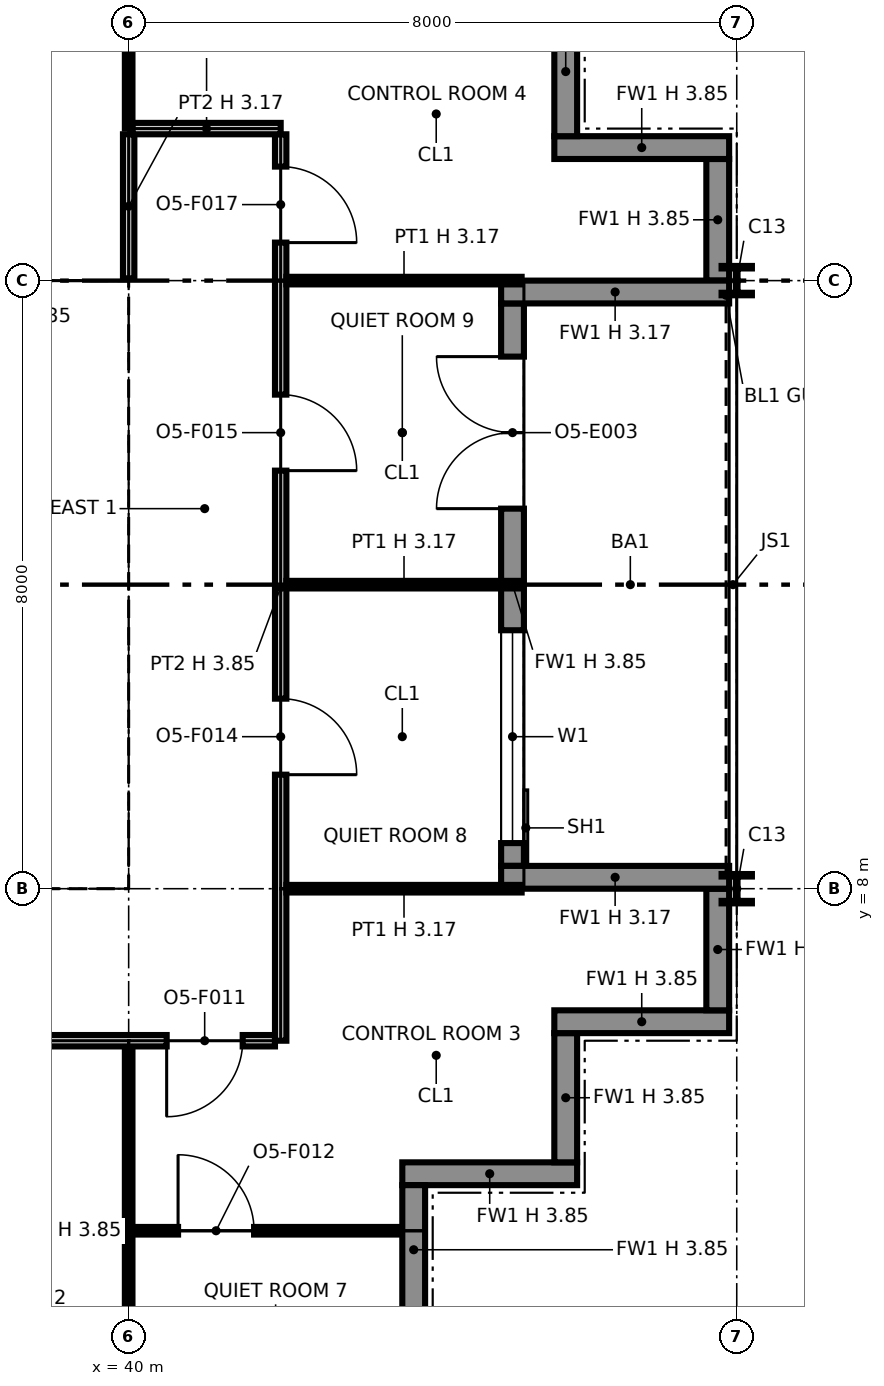
"""IFC4 building model, lengths in metres.
Left out: names, types, materials, properties, quantities, classifications, styles, units other than length and angle.
Written with IfcOpenShell. Run it as: python <this file> out.ifc"""

import sys

from ifc_helpers import new_model, si_unit, direction, frame, frame_2d, origin, origin_2d, place, context, subcontext, project, spatial, polyline, rectangle, i_section, outline, extrude, element, fill, save


model = new_model("IFC4")
c1 = context("Model", 3, precision=1e-05, world=origin(), true_north=direction((0.0, 1.0)))
c2 = subcontext(c1, "Body", "Model", "MODEL_VIEW")
j1 = project(units=[si_unit("LENGTHUNIT", "METRE"), si_unit("PLANEANGLEUNIT", "RADIAN")], contexts=[c1])
p1 = place(None, origin())
s1 = spatial("IfcSite", under=j1, at=p1, CompositionType="ELEMENT")
p2 = place(p1, origin())
s2 = spatial("IfcBuilding", under=s1, at=p2, CompositionType="ELEMENT")
p3 = place(p2, frame((0.0, 0.0, 225.0)))
s3 = spatial("IfcBuildingStorey", under=s2, at=p3, CompositionType="ELEMENT", Elevation=225.0)
for number, where, z_axis, x_axis in (
    (1, (40.0, 8.0, 0.0), (0.0, 0.0, 1.0), (1.0, 0.0, 0.0)),
    (2, (40.0, 16.0, 0.0), (0.0, 0.0, 1.0), (1.0, 0.0, 0.0)),
):
    element("IfcColumn", number, at=place(p3, frame(where, z_axis=z_axis, x_axis=x_axis)), inside=s3, PredefinedType="COLUMN", context=c2, shape_type="SweptSolid", body=[
        extrude(i_section(OverallWidth=0.373, OverallDepth=0.368, WebThickness=0.015, FlangeThickness=0.024, at=origin_2d()), origin(), (0.0, 0.0, 1.0), 3.85),
    ])
for number, where, z_axis, x_axis in (
    (3, (48.0, 8.0, 0.0), (0.0, 0.0, 1.0), (1.0, 0.0, 0.0)),
    (4, (48.0, 16.0, 0.0), (0.0, 0.0, 1.0), (1.0, 0.0, 0.0)),
):
    element("IfcColumn", number, at=place(p3, frame(where, z_axis=z_axis, x_axis=x_axis)), inside=s3, PredefinedType="COLUMN", context=c2, shape_type="SweptSolid", body=[
        extrude(i_section(OverallWidth=0.399, OverallDepth=0.386, WebThickness=0.021, FlangeThickness=0.033, at=origin_2d()), origin(), (0.0, 0.0, 1.0), 3.85),
    ])
p4 = place(p3, frame((43.75, 2.4, 0.0), z_axis=(0.0, 0.0, 1.0), x_axis=(0.0, 1.0, 0.0)))
e5 = element("IfcWall", 5, at=p4, inside=s3, PredefinedType="SOLIDWALL", context=c2, shape_type="SweptSolid", body=[
    extrude(rectangle(XDim=1.7, YDim=0.3, at=frame_2d((0.85, 0.0))), origin(), (0.0, 0.0, 1.0), 3.85),
])
p5 = place(p3, frame((43.6, 4.25, 0.0), z_axis=(0.0, 0.0, 1.0), x_axis=(1.0, 0.0, 0.0)))
e6 = element("IfcWall", 6, at=p5, inside=s3, PredefinedType="SOLIDWALL", context=c2, shape_type="SweptSolid", body=[
    extrude(rectangle(XDim=2.3, YDim=0.3, at=frame_2d((1.15, 0.0))), origin(), (0.0, 0.0, 1.0), 3.85),
])
p6 = place(p3, frame((45.75, 4.4, 0.0), z_axis=(0.0, 0.0, 1.0), x_axis=(0.0, 1.0, 0.0)))
e7 = element("IfcWall", 7, at=p6, inside=s3, PredefinedType="SOLIDWALL", context=c2, shape_type="SweptSolid", body=[
    extrude(rectangle(XDim=1.7, YDim=0.3, at=frame_2d((0.85, 0.0))), origin(), (0.0, 0.0, 1.0), 3.85),
])
p7 = place(p3, frame((45.6, 6.25, 0.0), z_axis=(0.0, 0.0, 1.0), x_axis=(1.0, 0.0, 0.0)))
e8 = element("IfcWall", 8, at=p7, inside=s3, PredefinedType="SOLIDWALL", context=c2, shape_type="SweptSolid", body=[
    extrude(rectangle(XDim=2.3, YDim=0.3, at=frame_2d((1.15, 0.0))), origin(), (0.0, 0.0, 1.0), 3.85),
])
p8 = place(p3, frame((47.75, 6.4, 0.0), z_axis=(0.0, 0.0, 1.0), x_axis=(0.0, 1.0, 0.0)))
e9 = element("IfcWall", 9, at=p8, inside=s3, PredefinedType="SOLIDWALL", context=c2, shape_type="SweptSolid", body=[
    extrude(rectangle(XDim=1.6, YDim=0.3, at=frame_2d((0.8, 0.0))), origin(), (0.0, 0.0, 1.0), 3.85),
])
p9 = place(p3, frame((45.05, 8.3, 0.0), z_axis=(0.0, 0.0, 1.0), x_axis=(0.0, 1.0, 0.0)))
e10 = element("IfcWall", 10, at=p9, inside=s3, PredefinedType="SOLIDWALL", context=c2, shape_type="SweptSolid", body=[
    extrude(rectangle(XDim=7.4, YDim=0.3, at=frame_2d((3.7, 0.0))), origin(), (0.0, 0.0, 1.0), 3.85),
])
p10 = place(p9, frame((0.3, 0.0, 0.9)))
e11 = element("IfcOpeningElement", 11, at=p10, cuts=e10, PredefinedType="OPENING", context=c2, shape_type="SweptSolid", body=[
    extrude(rectangle(XDim=2.8, YDim=2.2, at=frame_2d((1.4, 1.1))), frame((0.0, 0.16, 0.0), z_axis=(0.0, -1.0, 0.0), x_axis=(1.0, 0.0, 0.0)), (0.0, 0.0, 1.0), 0.32),
])
p11 = place(p9, frame((4.7, 0.0, 0.0)))
e12 = element("IfcOpeningElement", 12, at=p11, cuts=e10, PredefinedType="OPENING", context=c2, shape_type="SweptSolid", body=[
    extrude(rectangle(XDim=2.0, YDim=2.4, at=frame_2d((1.0, 1.2))), frame((0.0, 0.16, 0.0), z_axis=(0.0, -1.0, 0.0), x_axis=(1.0, 0.0, 0.0)), (0.0, 0.0, 1.0), 0.32),
])
for number, where, z_axis, x_axis in (
    (13, (47.9, 8.15, 0.0), (0.0, 0.0, 1.0), (-1.0, 0.0, 0.0)),
    (14, (47.9, 15.85, 0.0), (0.0, 0.0, 1.0), (-1.0, 0.0, 0.0)),
):
    element("IfcWall", number, at=place(p3, frame(where, z_axis=z_axis, x_axis=x_axis)), inside=s3, PredefinedType="SOLIDWALL", context=c2, shape_type="SweptSolid", body=[
        extrude(rectangle(XDim=3.0, YDim=0.3, at=frame_2d((1.5, 0.0))), origin(), (0.0, 0.0, 1.0), 3.171),
    ])
p12 = place(p3, frame((47.75, 16.0, 0.0), z_axis=(0.0, 0.0, 1.0), x_axis=(0.0, 1.0, 0.0)))
e15 = element("IfcWall", 15, at=p12, inside=s3, PredefinedType="SOLIDWALL", context=c2, shape_type="SweptSolid", body=[
    extrude(rectangle(XDim=1.6, YDim=0.3, at=frame_2d((0.8, 0.0))), origin(), (0.0, 0.0, 1.0), 3.85),
])
p13 = place(p3, frame((47.9, 17.75, 0.0), z_axis=(0.0, 0.0, 1.0), x_axis=(-1.0, 0.0, 0.0)))
e16 = element("IfcWall", 16, at=p13, inside=s3, PredefinedType="SOLIDWALL", context=c2, shape_type="SweptSolid", body=[
    extrude(rectangle(XDim=2.3, YDim=0.3, at=frame_2d((1.15, 0.0))), origin(), (0.0, 0.0, 1.0), 3.85),
])
p14 = place(p3, frame((45.75, 17.9, 0.0), z_axis=(0.0, 0.0, 1.0), x_axis=(0.0, 1.0, 0.0)))
e17 = element("IfcWall", 17, at=p14, inside=s3, PredefinedType="SOLIDWALL", context=c2, shape_type="SweptSolid", body=[
    extrude(rectangle(XDim=1.7, YDim=0.3, at=frame_2d((0.85, 0.0))), origin(), (0.0, 0.0, 1.0), 3.85),
])
p15 = place(p3, frame((24.65, 8.75, 0.0), z_axis=(0.0, 0.0, 1.0), x_axis=(1.0, 0.0, 0.0)))
e18 = element("IfcWall", 18, at=p15, inside=s3, PredefinedType="PARTITIONING", context=c2, shape_type="SweptSolid", body=[
    extrude(outline(polyline([(0.0, 0.0), (14.7, 0.0), (14.7, 3.85), (7.438, 3.85), (7.438, 3.308), (7.262, 3.308), (7.261, 3.85), (0.0, 3.85), (0.0, 0.0)])), frame((0.0, 0.1, 0.0), z_axis=(0.0, -1.0, 0.0), x_axis=(1.0, 0.0, 0.0)), (0.0, 0.0, 1.0), 0.2),
])
p16 = place(p3, frame((24.65, 15.25, 0.0), z_axis=(0.0, 0.0, 1.0), x_axis=(1.0, 0.0, 0.0)))
e19 = element("IfcWall", 19, at=p16, inside=s3, PredefinedType="PARTITIONING", context=c2, shape_type="SweptSolid", body=[
    extrude(outline(polyline([(0.0, 0.0), (14.7, 0.0), (14.7, 3.85), (7.438, 3.85), (7.438, 3.308), (7.262, 3.308), (7.261, 3.85), (0.0, 3.85), (0.0, 0.0)])), frame((0.0, 0.1, 0.0), z_axis=(0.0, -1.0, 0.0), x_axis=(1.0, 0.0, 0.0)), (0.0, 0.0, 1.0), 0.2),
])
p17 = place(p16, frame((2.85, 0.0, 0.0)))
e20 = element("IfcOpeningElement", 20, at=p17, cuts=e19, PredefinedType="OPENING", context=c2, shape_type="SweptSolid", body=[
    extrude(rectangle(XDim=1.8, YDim=2.1, at=frame_2d((0.9, 1.05))), frame((0.0, 0.11, 0.0), z_axis=(0.0, -1.0, 0.0), x_axis=(1.0, 0.0, 0.0)), (0.0, 0.0, 1.0), 0.22),
])
p18 = place(p16, frame((9.95, 0.0, 0.0), z_axis=(0.0, 0.0, 1.0), x_axis=(-1.0, 0.0, 0.0)))
e21 = element("IfcOpeningElement", 21, at=p18, cuts=e19, PredefinedType="OPENING", context=c2, shape_type="SweptSolid", body=[
    extrude(rectangle(XDim=1.4, YDim=2.1, at=frame_2d((0.7, 1.05))), frame((0.0, 0.11, 0.0), z_axis=(0.0, -1.0, 0.0), x_axis=(1.0, 0.0, 0.0)), (0.0, 0.0, 1.0), 0.22),
])
p19 = place(p16, frame((13.4, 0.0, 0.0), z_axis=(0.0, 0.0, 1.0), x_axis=(-1.0, 0.0, 0.0)))
e22 = element("IfcOpeningElement", 22, at=p19, cuts=e19, PredefinedType="OPENING", context=c2, shape_type="SweptSolid", body=[
    extrude(rectangle(XDim=1.4, YDim=2.1, at=frame_2d((0.7, 1.05))), frame((0.0, 0.11, 0.0), z_axis=(0.0, -1.0, 0.0), x_axis=(1.0, 0.0, 0.0)), (0.0, 0.0, 1.0), 0.22),
])
p20 = place(p3, frame((39.25, 8.85, 0.0), z_axis=(0.0, 0.0, 1.0), x_axis=(0.0, 1.0, 0.0)))
e23 = element("IfcWall", 23, at=p20, inside=s3, PredefinedType="PARTITIONING", context=c2, shape_type="SweptSolid", body=[
    extrude(rectangle(XDim=6.3, YDim=0.2, at=frame_2d((3.15, 0.0))), origin(), (0.0, 0.0, 1.0), 3.85),
])
p21 = place(p3, frame((40.0, 0.13, 0.0), z_axis=(0.0, 0.0, 1.0), x_axis=(0.0, 1.0, 0.0)))
e24 = element("IfcWall", 24, at=p21, inside=s3, PredefinedType="PARTITIONING", context=c2, shape_type="SweptSolid", body=[
    extrude(rectangle(XDim=3.32, YDim=0.1, at=frame_2d((1.66, 0.0))), origin(), (0.0, 0.0, 1.0), 3.172),
])
p22 = place(p3, frame((40.05, 3.5, 0.0), z_axis=(0.0, 0.0, 1.0), x_axis=(1.0, 0.0, 0.0)))
e25 = element("IfcWall", 25, at=p22, inside=s3, PredefinedType="PARTITIONING", context=c2, shape_type="SweptSolid", body=[
    extrude(rectangle(XDim=3.52, YDim=0.1, at=frame_2d((1.76, 0.0))), origin(), (0.0, 0.0, 1.0), 3.85),
])
p23 = place(p22, frame((0.6, 0.0, 0.0)))
e26 = element("IfcOpeningElement", 26, at=p23, cuts=e25, PredefinedType="OPENING", context=c2, shape_type="SweptSolid", body=[
    extrude(rectangle(XDim=1.0, YDim=2.1, at=frame_2d((0.5, 1.05))), frame((0.0, 0.06, 0.0), z_axis=(0.0, -1.0, 0.0), x_axis=(1.0, 0.0, 0.0)), (0.0, 0.0, 1.0), 0.12),
])
p24 = place(p3, frame((40.0, 3.5, 0.0), z_axis=(0.0, 0.0, 1.0), x_axis=(0.0, 1.0, 0.0)))
e27 = element("IfcWall", 27, at=p24, inside=s3, PredefinedType="PARTITIONING", context=c2, shape_type="SweptSolid", body=[
    extrude(rectangle(XDim=2.425, YDim=0.1, at=frame_2d((1.212, 0.0))), origin(), (0.0, 0.0, 1.0), 3.172),
])
p25 = place(p3, frame((6.075, 6.0, 0.0), z_axis=(0.0, 0.0, 1.0), x_axis=(1.0, 0.0, 0.0)))
e28 = element("IfcWall", 28, at=p25, inside=s3, PredefinedType="PARTITIONING", context=c2, shape_type="SweptSolid", body=[
    extrude(rectangle(XDim=35.85, YDim=0.15, at=frame_2d((17.925, 0.0))), origin(), (0.0, 0.0, 1.0), 3.85),
])
p26 = place(p25, frame((12.425, 0.0, 0.0), z_axis=(0.0, 0.0, 1.0), x_axis=(-1.0, 0.0, 0.0)))
e29 = element("IfcOpeningElement", 29, at=p26, cuts=e28, PredefinedType="OPENING", context=c2, shape_type="SweptSolid", body=[
    extrude(rectangle(XDim=1.0, YDim=2.1, at=frame_2d((0.5, 1.05))), frame((0.0, 0.085, 0.0), z_axis=(0.0, -1.0, 0.0), x_axis=(1.0, 0.0, 0.0)), (0.0, 0.0, 1.0), 0.17),
])
p27 = place(p25, frame((16.425, 0.0, 0.0), z_axis=(0.0, 0.0, 1.0), x_axis=(-1.0, 0.0, 0.0)))
e30 = element("IfcOpeningElement", 30, at=p27, cuts=e28, PredefinedType="OPENING", context=c2, shape_type="SweptSolid", body=[
    extrude(rectangle(XDim=1.0, YDim=2.1, at=frame_2d((0.5, 1.05))), frame((0.0, 0.085, 0.0), z_axis=(0.0, -1.0, 0.0), x_axis=(1.0, 0.0, 0.0)), (0.0, 0.0, 1.0), 0.17),
])
p28 = place(p25, frame((28.425, 0.0, 0.0), z_axis=(0.0, 0.0, 1.0), x_axis=(-1.0, 0.0, 0.0)))
e31 = element("IfcOpeningElement", 31, at=p28, cuts=e28, PredefinedType="OPENING", context=c2, shape_type="SweptSolid", body=[
    extrude(rectangle(XDim=1.0, YDim=2.1, at=frame_2d((0.5, 1.05))), frame((0.0, 0.085, 0.0), z_axis=(0.0, -1.0, 0.0), x_axis=(1.0, 0.0, 0.0)), (0.0, 0.0, 1.0), 0.17),
])
p29 = place(p25, frame((32.425, 0.0, 0.0), z_axis=(0.0, 0.0, 1.0), x_axis=(-1.0, 0.0, 0.0)))
e32 = element("IfcOpeningElement", 32, at=p29, cuts=e28, PredefinedType="OPENING", context=c2, shape_type="SweptSolid", body=[
    extrude(rectangle(XDim=1.0, YDim=2.1, at=frame_2d((0.5, 1.05))), frame((0.0, 0.085, 0.0), z_axis=(0.0, -1.0, 0.0), x_axis=(1.0, 0.0, 0.0)), (0.0, 0.0, 1.0), 0.17),
])
p30 = place(p25, frame((4.425, 0.0, 0.0), z_axis=(0.0, 0.0, 1.0), x_axis=(-1.0, 0.0, 0.0)))
e33 = element("IfcOpeningElement", 33, at=p30, cuts=e28, PredefinedType="OPENING", context=c2, shape_type="SweptSolid", body=[
    extrude(rectangle(XDim=1.0, YDim=2.1, at=frame_2d((0.5, 1.05))), frame((0.0, 0.085, 0.0), z_axis=(0.0, -1.0, 0.0), x_axis=(1.0, 0.0, 0.0)), (0.0, 0.0, 1.0), 0.17),
])
p31 = place(p25, frame((8.425, 0.0, 0.0), z_axis=(0.0, 0.0, 1.0), x_axis=(-1.0, 0.0, 0.0)))
e34 = element("IfcOpeningElement", 34, at=p31, cuts=e28, PredefinedType="OPENING", context=c2, shape_type="SweptSolid", body=[
    extrude(rectangle(XDim=1.0, YDim=2.1, at=frame_2d((0.5, 1.05))), frame((0.0, 0.085, 0.0), z_axis=(0.0, -1.0, 0.0), x_axis=(1.0, 0.0, 0.0)), (0.0, 0.0, 1.0), 0.17),
])
p32 = place(p25, frame((23.425, 0.0, 0.0), z_axis=(0.0, 0.0, 1.0), x_axis=(-1.0, 0.0, 0.0)))
e35 = element("IfcOpeningElement", 35, at=p32, cuts=e28, PredefinedType="OPENING", context=c2, shape_type="SweptSolid", body=[
    extrude(rectangle(XDim=1.0, YDim=2.1, at=frame_2d((0.5, 1.05))), frame((0.0, 0.085, 0.0), z_axis=(0.0, -1.0, 0.0), x_axis=(1.0, 0.0, 0.0)), (0.0, 0.0, 1.0), 0.17),
])
p33 = place(p25, frame((35.425, 0.0, 0.0), z_axis=(0.0, 0.0, 1.0), x_axis=(-1.0, 0.0, 0.0)))
e36 = element("IfcOpeningElement", 36, at=p33, cuts=e28, PredefinedType="OPENING", context=c2, shape_type="SweptSolid", body=[
    extrude(rectangle(XDim=1.0, YDim=2.1, at=frame_2d((0.5, 1.05))), frame((0.0, 0.085, 0.0), z_axis=(0.0, -1.0, 0.0), x_axis=(1.0, 0.0, 0.0)), (0.0, 0.0, 1.0), 0.17),
])
p34 = place(p3, frame((42.0, 6.0, 0.0), z_axis=(0.0, 0.0, 1.0), x_axis=(0.0, 1.0, 0.0)))
e37 = element("IfcWall", 37, at=p34, inside=s3, PredefinedType="PARTITIONING", context=c2, shape_type="SweptSolid", body=[
    extrude(outline(polyline([(0.0, 0.0), (11.925, 0.0), (11.925, 3.85), (10.3, 3.85), (10.298, 3.172), (9.702, 3.172), (9.7, 3.85), (6.3, 3.85), (6.298, 3.172), (5.702, 3.172), (5.7, 3.85), (2.3, 3.85), (2.298, 3.172), (1.702, 3.172), (1.7, 3.85), (0.0, 3.85), (0.0, 0.0)])), frame((0.0, 0.075, 0.0), z_axis=(0.0, -1.0, 0.0), x_axis=(1.0, 0.0, 0.0)), (0.0, 0.0, 1.0), 0.15),
])
p35 = place(p34, frame((4.5, 0.0, 0.0), z_axis=(0.0, 0.0, 1.0), x_axis=(-1.0, 0.0, 0.0)))
e38 = element("IfcOpeningElement", 38, at=p35, cuts=e37, PredefinedType="OPENING", context=c2, shape_type="SweptSolid", body=[
    extrude(rectangle(XDim=1.0, YDim=2.1, at=frame_2d((0.5, 1.05))), frame((0.0, 0.085, 0.0), z_axis=(0.0, -1.0, 0.0), x_axis=(1.0, 0.0, 0.0)), (0.0, 0.0, 1.0), 0.17),
])
p36 = place(p34, frame((8.5, 0.0, 0.0), z_axis=(0.0, 0.0, 1.0), x_axis=(-1.0, 0.0, 0.0)))
e39 = element("IfcOpeningElement", 39, at=p36, cuts=e37, PredefinedType="OPENING", context=c2, shape_type="SweptSolid", body=[
    extrude(rectangle(XDim=1.0, YDim=2.1, at=frame_2d((0.5, 1.05))), frame((0.0, 0.085, 0.0), z_axis=(0.0, -1.0, 0.0), x_axis=(1.0, 0.0, 0.0)), (0.0, 0.0, 1.0), 0.17),
])
p37 = place(p34, frame((11.5, 0.0, 0.0), z_axis=(0.0, 0.0, 1.0), x_axis=(-1.0, 0.0, 0.0)))
e40 = element("IfcOpeningElement", 40, at=p37, cuts=e37, PredefinedType="OPENING", context=c2, shape_type="SweptSolid", body=[
    extrude(rectangle(XDim=1.0, YDim=2.1, at=frame_2d((0.5, 1.05))), frame((0.0, 0.085, 0.0), z_axis=(0.0, -1.0, 0.0), x_axis=(1.0, 0.0, 0.0)), (0.0, 0.0, 1.0), 0.17),
])
for number, where, z_axis, x_axis in (
    (41, (42.075, 8.0, 0.0), (0.0, 0.0, 1.0), (1.0, 0.0, 0.0)),
    (42, (42.075, 12.0, 0.0), (0.0, 0.0, 1.0), (1.0, 0.0, 0.0)),
    (43, (42.075, 16.0, 0.0), (0.0, 0.0, 1.0), (1.0, 0.0, 0.0)),
):
    element("IfcWall", number, at=place(p3, frame(where, z_axis=z_axis, x_axis=x_axis)), inside=s3, PredefinedType="PARTITIONING", context=c2, shape_type="SweptSolid", body=[
        extrude(rectangle(XDim=3.095, YDim=0.1, at=frame_2d((1.547, 0.0))), origin(), (0.0, 0.0, 1.0), 3.172),
    ])
p38 = place(p3, frame((40.0, 16.03, 0.0), z_axis=(0.0, 0.0, 1.0), x_axis=(0.0, 1.0, 0.0)))
e44 = element("IfcWall", 44, at=p38, inside=s3, PredefinedType="PARTITIONING", context=c2, shape_type="SweptSolid", body=[
    extrude(rectangle(XDim=1.895, YDim=0.15, at=frame_2d((0.948, 0.0))), origin(), (0.0, 0.0, 1.0), 3.172),
])
p39 = place(p3, frame((40.05, 18.0, 0.0), z_axis=(0.0, 0.0, 1.0), x_axis=(1.0, 0.0, 0.0)))
e45 = element("IfcWall", 45, at=p39, inside=s3, PredefinedType="PARTITIONING", context=c2, shape_type="SweptSolid", body=[
    extrude(rectangle(XDim=1.95, YDim=0.15, at=frame_2d((0.975, 0.0))), origin(), (0.0, 0.0, 1.0), 3.85),
])
p40 = place(p3, frame((40.0, 18.0, 0.0), z_axis=(0.0, 0.0, 1.0), x_axis=(0.0, 1.0, 0.0)))
e46 = element("IfcWall", 46, at=p40, inside=s3, PredefinedType="PARTITIONING", context=c2, shape_type="SweptSolid", body=[
    extrude(rectangle(XDim=2.45, YDim=0.1, at=frame_2d((1.225, 0.0))), origin(), (0.0, 0.0, 1.0), 3.172),
])
p41 = place(p10, origin())
e47 = element("IfcWindow", 47, at=p41, inside=s3, PartitioningType="SINGLE_PANEL", PredefinedType="WINDOW", context=c2, shape_type="SweptSolid", body=[
    extrude(rectangle(XDim=2.8, YDim=2.2, at=frame_2d((1.4, 1.1))), frame((0.0, 0.03, 0.0), z_axis=(0.0, -1.0, 0.0), x_axis=(1.0, 0.0, 0.0)), (0.0, 0.0, 1.0), 0.06),
])
fill(e11, e47)
p42 = place(p11, origin())
e48 = element("IfcDoor", 48, at=p42, inside=s3, OperationType="DOUBLE_DOOR_SINGLE_SWING", PredefinedType="DOOR", context=c2, shape_type="SweptSolid", body=[
    extrude(rectangle(XDim=2.0, YDim=2.4, at=frame_2d((1.0, 1.2))), frame((0.0, 0.025, 0.0), z_axis=(0.0, -1.0, 0.0), x_axis=(1.0, 0.0, 0.0)), (0.0, 0.0, 1.0), 0.05),
])
fill(e12, e48)
p43 = place(p33, origin())
e49 = element("IfcDoor", 49, at=p43, inside=s3, OperationType="SINGLE_SWING_RIGHT", PredefinedType="DOOR", context=c2, shape_type="SweptSolid", body=[
    extrude(rectangle(XDim=1.0, YDim=2.1, at=frame_2d((0.5, 1.05))), frame((0.0, 0.025, 0.0), z_axis=(0.0, -1.0, 0.0), x_axis=(1.0, 0.0, 0.0)), (0.0, 0.0, 1.0), 0.05),
])
fill(e36, e49)
p44 = place(p23, origin())
e50 = element("IfcDoor", 50, at=p44, inside=s3, OperationType="SINGLE_SWING_LEFT", PredefinedType="DOOR", context=c2, shape_type="SweptSolid", body=[
    extrude(rectangle(XDim=1.0, YDim=2.1, at=frame_2d((0.5, 1.05))), frame((0.0, 0.025, 0.0), z_axis=(0.0, -1.0, 0.0), x_axis=(1.0, 0.0, 0.0)), (0.0, 0.0, 1.0), 0.05),
])
fill(e26, e50)
p45 = place(p35, origin())
e51 = element("IfcDoor", 51, at=p45, inside=s3, OperationType="SINGLE_SWING_RIGHT", PredefinedType="DOOR", context=c2, shape_type="SweptSolid", body=[
    extrude(rectangle(XDim=1.0, YDim=2.1, at=frame_2d((0.5, 1.05))), frame((0.0, 0.025, 0.0), z_axis=(0.0, -1.0, 0.0), x_axis=(1.0, 0.0, 0.0)), (0.0, 0.0, 1.0), 0.05),
])
fill(e38, e51)
p46 = place(p36, origin())
e52 = element("IfcDoor", 52, at=p46, inside=s3, OperationType="SINGLE_SWING_RIGHT", PredefinedType="DOOR", context=c2, shape_type="SweptSolid", body=[
    extrude(rectangle(XDim=1.0, YDim=2.1, at=frame_2d((0.5, 1.05))), frame((0.0, 0.025, 0.0), z_axis=(0.0, -1.0, 0.0), x_axis=(1.0, 0.0, 0.0)), (0.0, 0.0, 1.0), 0.05),
])
fill(e39, e52)
p47 = place(p37, origin())
e53 = element("IfcDoor", 53, at=p47, inside=s3, OperationType="SINGLE_SWING_RIGHT", PredefinedType="DOOR", context=c2, shape_type="SweptSolid", body=[
    extrude(rectangle(XDim=1.0, YDim=2.1, at=frame_2d((0.5, 1.05))), frame((0.0, 0.025, 0.0), z_axis=(0.0, -1.0, 0.0), x_axis=(1.0, 0.0, 0.0)), (0.0, 0.0, 1.0), 0.05),
])
fill(e40, e53)
save(model, sys.argv[1])
